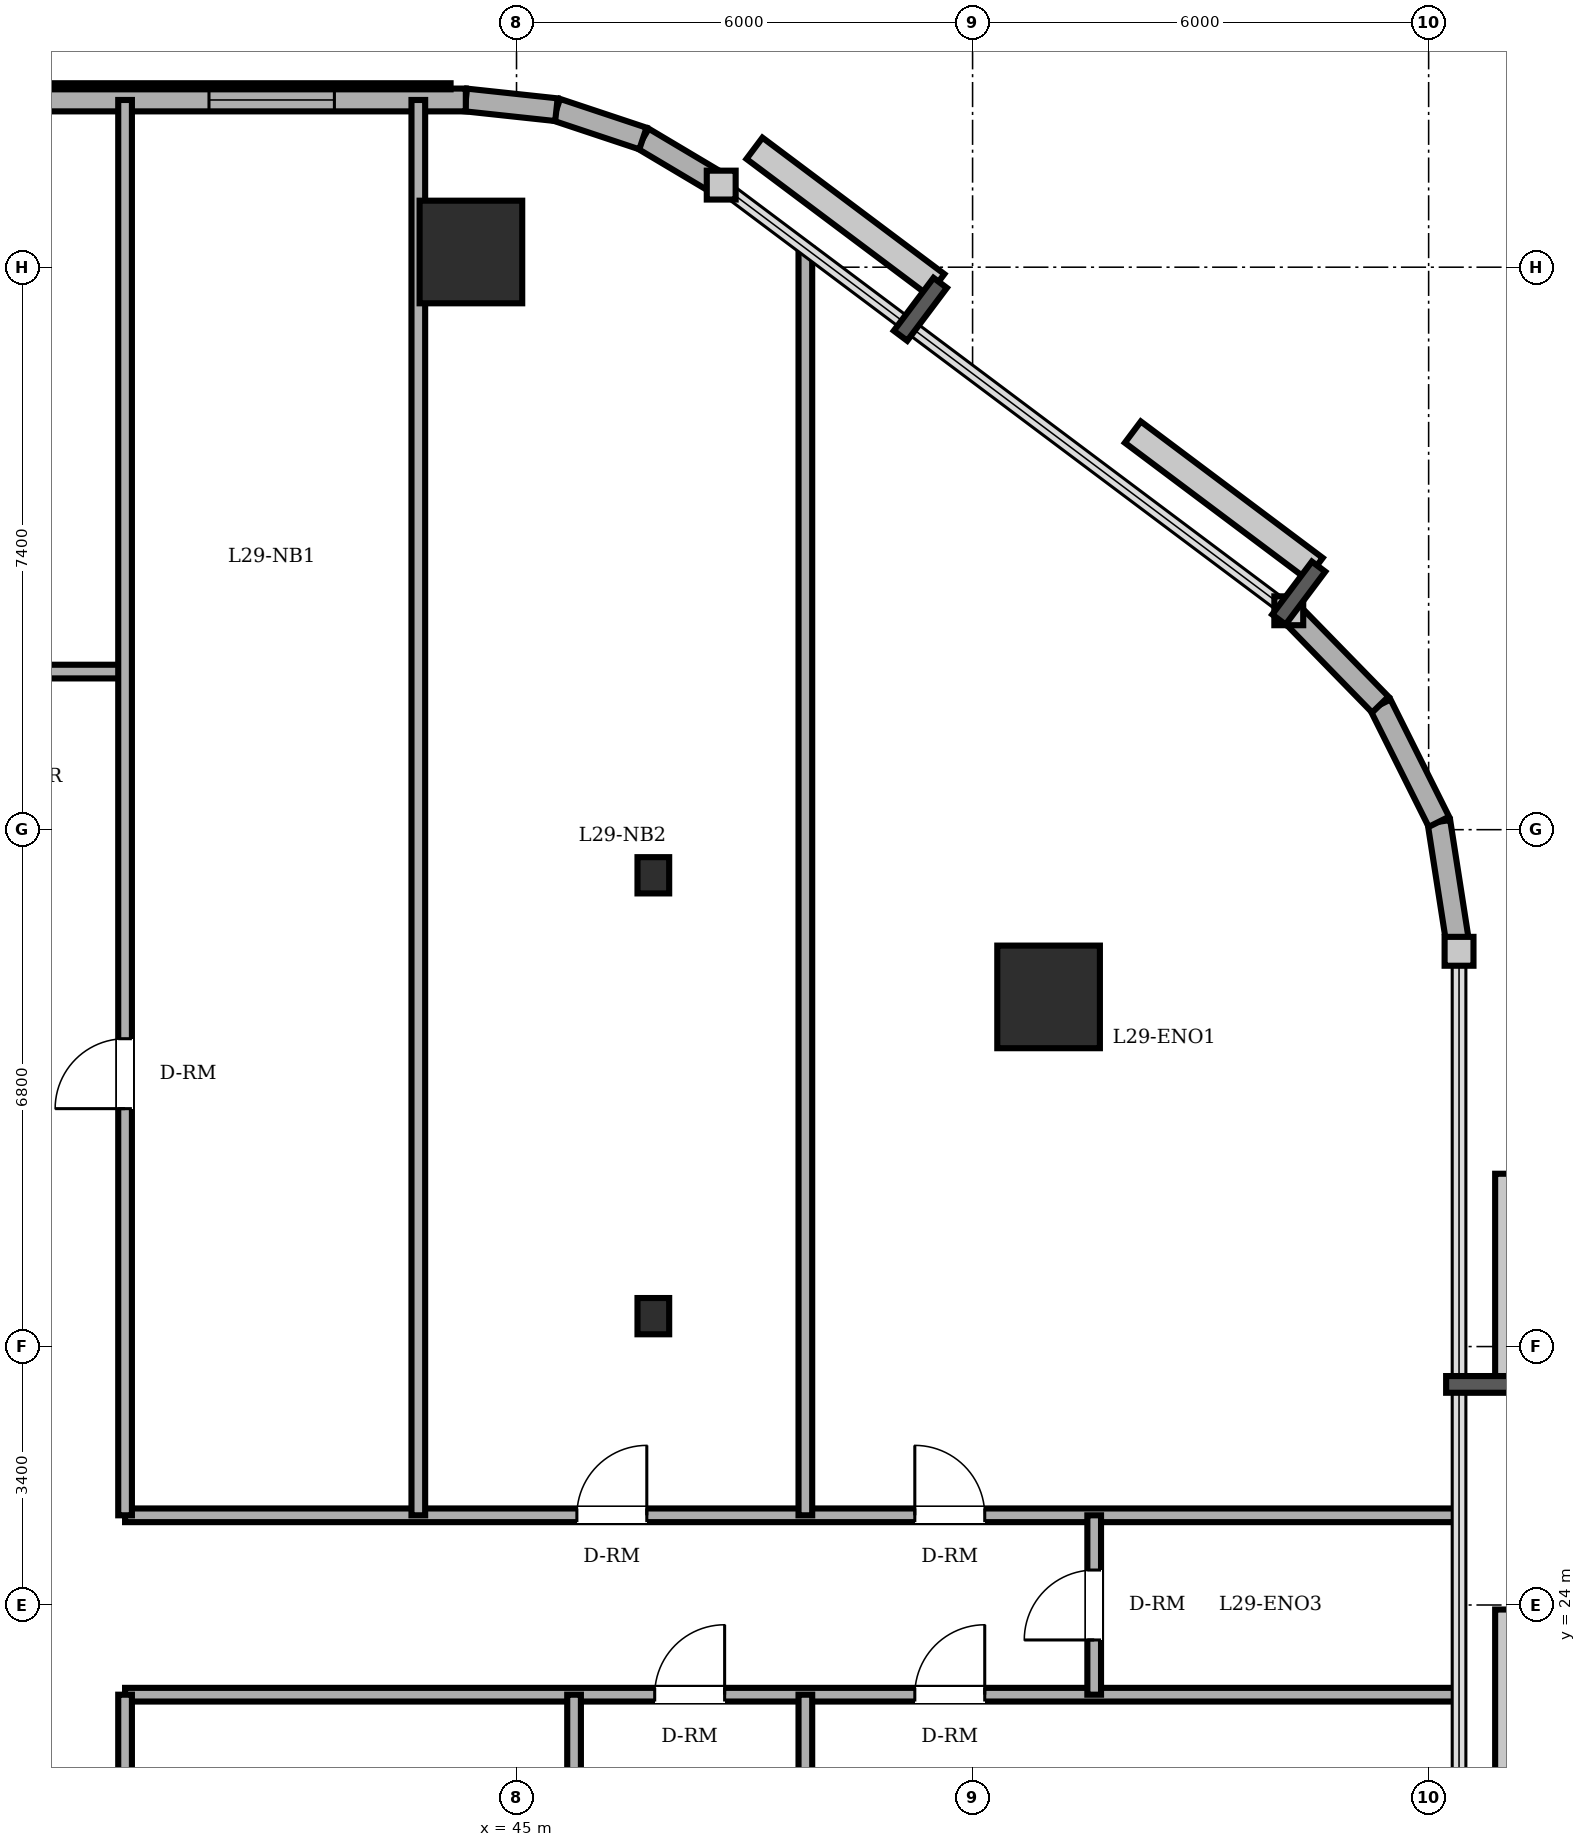
"""IFC4 building model, lengths in metres.
Left out: names, types, materials, properties, quantities, classifications, styles, units other than length and angle.
Written with IfcOpenShell. Run it as: python <this file> out.ifc"""

import sys

from ifc_helpers import new_model, si_unit, direction, frame, frame_2d, origin, origin_2d, place, context, subcontext, project, spatial, rectangle, circle, i_section, extrude, element, fill, save


model = new_model("IFC4")
c1 = context("Model", 3, precision=1e-05, world=origin(), true_north=direction((0.0, 1.0)))
c2 = subcontext(c1, "Body", "Model", "MODEL_VIEW")
j1 = project(units=[si_unit("LENGTHUNIT", "METRE"), si_unit("PLANEANGLEUNIT", "RADIAN")], contexts=[c1])
p1 = place(None, origin())
s1 = spatial("IfcSite", under=j1, at=p1, CompositionType="ELEMENT")
p2 = place(p1, origin())
s2 = spatial("IfcBuilding", under=s1, at=p2, CompositionType="ELEMENT")
p3 = place(p2, frame((0.0, 0.0, 111.5)))
s3 = spatial("IfcBuildingStorey", under=s2, at=p3, CompositionType="ELEMENT", Elevation=111.5)
for number, where, z_axis, x_axis in (
    (1, (52.0, 32.0, 0.0), (0.0, 0.0, 1.0), (1.0, 0.0, 0.0)),
    (2, (44.4, 41.8, 0.0), (0.0, 0.0, 1.0), (1.0, 0.0, 0.0)),
):
    element("IfcColumn", number, at=place(p3, frame(where, z_axis=z_axis, x_axis=x_axis)), inside=s3, PredefinedType="COLUMN", context=c2, shape_type="SweptSolid", body=[
        extrude(circle(Radius=0.675, at=origin_2d()), origin(), (0.0, 0.0, 1.0), 3.6),
    ])
for number, where, z_axis, x_axis in (
    (3, (46.8, 27.8, 0.0), (0.0, 0.0, 1.0), (1.0, 0.0, 0.0)),
    (4, (46.8, 33.6, 0.0), (0.0, 0.0, 1.0), (1.0, 0.0, 0.0)),
):
    element("IfcColumn", number, at=place(p3, frame(where, z_axis=z_axis, x_axis=x_axis)), inside=s3, PredefinedType="COLUMN", context=c2, shape_type="SweptSolid", body=[
        extrude(i_section(OverallWidth=0.417, OverallDepth=0.477, WebThickness=0.036, FlangeThickness=0.057, FilletRadius=0.015, at=origin_2d()), origin(), (0.0, 0.0, 1.0), 3.6),
    ])
p4 = place(p3, frame((57.4, 32.6, 0.0), z_axis=(0.0, 0.0, 1.0), x_axis=(-0.153620989032, 0.988129845581, 0.0)))
e5 = element("IfcWall", 5, at=p4, inside=s3, PredefinedType="SOLIDWALL", context=c2, shape_type="SweptSolid", body=[
    extrude(rectangle(XDim=1.724, YDim=0.3, at=frame_2d((0.862, 0.0))), origin(), (0.0, 0.0, 1.0), 3.4),
])
for number, where, z_axis, x_axis in (
    (6, (57.135, 34.304, 0.0), (0.0, 0.0, 1.0), (-0.447, 0.894, 0.0)),
    (7, (56.364, 35.846, 0.0), (0.0, 0.0, 1.0), (-0.698, 0.716, 0.0)),
):
    element("IfcWall", number, at=place(p3, frame(where, z_axis=z_axis, x_axis=x_axis)), inside=s3, PredefinedType="SOLIDWALL", context=c2, shape_type="SweptSolid", body=[
        extrude(rectangle(XDim=1.724, YDim=0.3, at=frame_2d((0.862, 0.0))), origin(), (0.0, 0.0, 1.0), 3.4),
    ])
p5 = place(p3, frame((47.693, 42.68, 0.0), z_axis=(0.0, 0.0, 1.0), x_axis=(-0.859320591642, 0.511437308749, 0.0)))
e8 = element("IfcWall", 8, at=p5, inside=s3, PredefinedType="SOLIDWALL", context=c2, shape_type="SweptSolid", body=[
    extrude(rectangle(XDim=1.199, YDim=0.3, at=frame_2d((0.599, 0.0))), origin(), (0.0, 0.0, 1.0), 3.4),
])
p6 = place(p3, frame((46.663, 43.293, 0.0), z_axis=(0.0, 0.0, 1.0), x_axis=(-0.948744332129, 0.316044604847, 0.0)))
e9 = element("IfcWall", 9, at=p6, inside=s3, PredefinedType="SOLIDWALL", context=c2, shape_type="SweptSolid", body=[
    extrude(rectangle(XDim=1.2, YDim=0.3, at=frame_2d((0.6, 0.0))), origin(), (0.0, 0.0, 1.0), 3.4),
])
p7 = place(p3, frame((45.525, 43.672, 0.0), z_axis=(0.0, 0.0, 1.0), x_axis=(-0.994289103787, 0.106720092254, 0.0)))
e10 = element("IfcWall", 10, at=p7, inside=s3, PredefinedType="SOLIDWALL", context=c2, shape_type="SweptSolid", body=[
    extrude(rectangle(XDim=1.199, YDim=0.3, at=frame_2d((0.599, 0.0))), origin(), (0.0, 0.0, 1.0), 3.4),
])
p8 = place(p3, frame((44.333, 43.8, 0.0), z_axis=(0.0, 0.0, 1.0), x_axis=(-1.0, 0.0, 0.0)))
e11 = element("IfcWall", 11, at=p8, inside=s3, PredefinedType="SOLIDWALL", context=c2, shape_type="SweptSolid", body=[
    extrude(rectangle(XDim=29.933, YDim=0.3, at=frame_2d((14.967, 0.0))), origin(), (0.0, 0.0, 1.0), 3.4),
])
p9 = place(p8, frame((22.708, 0.0, 0.0)))
e12 = element("IfcOpeningElement", 12, at=p9, cuts=e11, PredefinedType="OPENING", context=c2, shape_type="SweptSolid", body=[
    extrude(rectangle(XDim=0.95, YDim=2.2, at=frame_2d((0.475, 1.1))), frame((0.0, 0.16, 0.0), z_axis=(0.0, -1.0, 0.0), x_axis=(1.0, 0.0, 0.0)), (0.0, 0.0, 1.0), 0.32),
])
p10 = place(p8, frame((1.729, 0.0, 0.85)))
e13 = element("IfcOpeningElement", 13, at=p10, cuts=e11, PredefinedType="OPENING", context=c2, shape_type="SweptSolid", body=[
    extrude(rectangle(XDim=1.65, YDim=1.55, at=frame_2d((0.825, 0.775))), frame((0.0, 0.16, 0.0), z_axis=(0.0, -1.0, 0.0), x_axis=(1.0, 0.0, 0.0)), (0.0, 0.0, 1.0), 0.32),
])
p11 = place(p8, frame((6.341, 0.0, 0.85)))
e14 = element("IfcOpeningElement", 14, at=p11, cuts=e11, PredefinedType="OPENING", context=c2, shape_type="SweptSolid", body=[
    extrude(rectangle(XDim=1.65, YDim=1.55, at=frame_2d((0.825, 0.775))), frame((0.0, 0.16, 0.0), z_axis=(0.0, -1.0, 0.0), x_axis=(1.0, 0.0, 0.0)), (0.0, 0.0, 1.0), 0.32),
])
p12 = place(p8, frame((9.025, 0.0, 0.85)))
e15 = element("IfcOpeningElement", 15, at=p12, cuts=e11, PredefinedType="OPENING", context=c2, shape_type="SweptSolid", body=[
    extrude(rectangle(XDim=1.65, YDim=1.55, at=frame_2d((0.825, 0.775))), frame((0.0, 0.16, 0.0), z_axis=(0.0, -1.0, 0.0), x_axis=(1.0, 0.0, 0.0)), (0.0, 0.0, 1.0), 0.32),
])
p13 = place(p8, frame((14.108, 0.0, 0.85)))
e16 = element("IfcOpeningElement", 16, at=p13, cuts=e11, PredefinedType="OPENING", context=c2, shape_type="SweptSolid", body=[
    extrude(rectangle(XDim=1.65, YDim=1.55, at=frame_2d((0.825, 0.775))), frame((0.0, 0.16, 0.0), z_axis=(0.0, -1.0, 0.0), x_axis=(1.0, 0.0, 0.0)), (0.0, 0.0, 1.0), 0.32),
])
p14 = place(p8, frame((16.508, 0.0, 0.85)))
e17 = element("IfcOpeningElement", 17, at=p14, cuts=e11, PredefinedType="OPENING", context=c2, shape_type="SweptSolid", body=[
    extrude(rectangle(XDim=1.65, YDim=1.55, at=frame_2d((0.825, 0.775))), frame((0.0, 0.16, 0.0), z_axis=(0.0, -1.0, 0.0), x_axis=(1.0, 0.0, 0.0)), (0.0, 0.0, 1.0), 0.32),
])
p15 = place(p8, frame((25.475, 0.0, 0.85)))
e18 = element("IfcOpeningElement", 18, at=p15, cuts=e11, PredefinedType="OPENING", context=c2, shape_type="SweptSolid", body=[
    extrude(rectangle(XDim=1.65, YDim=1.55, at=frame_2d((0.825, 0.775))), frame((0.0, 0.16, 0.0), z_axis=(0.0, -1.0, 0.0), x_axis=(1.0, 0.0, 0.0)), (0.0, 0.0, 1.0), 0.32),
])
p16 = place(p3, frame((39.85, 22.82, 0.0), z_axis=(0.0, 0.0, 1.0), x_axis=(1.0, 0.0, 0.0)))
e19 = element("IfcWall", 19, at=p16, inside=s3, PredefinedType="PARTITIONING", context=c2, shape_type="SweptSolid", body=[
    extrude(rectangle(XDim=17.55, YDim=0.18, at=frame_2d((8.775, 0.0))), origin(), (0.0, 0.0, 1.0), 3.4),
])
p17 = place(p16, frame((6.968, 0.0, 0.0)))
e20 = element("IfcOpeningElement", 20, at=p17, cuts=e19, PredefinedType="OPENING", context=c2, shape_type="SweptSolid", body=[
    extrude(rectangle(XDim=0.92, YDim=2.1, at=frame_2d((0.46, 1.05))), frame((0.0, 0.1, 0.0), z_axis=(0.0, -1.0, 0.0), x_axis=(1.0, 0.0, 0.0)), (0.0, 0.0, 1.0), 0.2),
])
p18 = place(p16, frame((10.39, 0.0, 0.0)))
e21 = element("IfcOpeningElement", 21, at=p18, cuts=e19, PredefinedType="OPENING", context=c2, shape_type="SweptSolid", body=[
    extrude(rectangle(XDim=0.92, YDim=2.1, at=frame_2d((0.46, 1.05))), frame((0.0, 0.1, 0.0), z_axis=(0.0, -1.0, 0.0), x_axis=(1.0, 0.0, 0.0)), (0.0, 0.0, 1.0), 0.2),
])
p19 = place(p3, frame((39.85, 25.18, 0.0), z_axis=(0.0, 0.0, 1.0), x_axis=(1.0, 0.0, 0.0)))
e22 = element("IfcWall", 22, at=p19, inside=s3, PredefinedType="PARTITIONING", context=c2, shape_type="SweptSolid", body=[
    extrude(rectangle(XDim=17.55, YDim=0.18, at=frame_2d((8.775, 0.0))), origin(), (0.0, 0.0, 1.0), 3.4),
])
p20 = place(p19, frame((5.944, 0.0, 0.0)))
e23 = element("IfcOpeningElement", 23, at=p20, cuts=e22, PredefinedType="OPENING", context=c2, shape_type="SweptSolid", body=[
    extrude(rectangle(XDim=0.92, YDim=2.1, at=frame_2d((0.46, 1.05))), frame((0.0, 0.1, 0.0), z_axis=(0.0, -1.0, 0.0), x_axis=(1.0, 0.0, 0.0)), (0.0, 0.0, 1.0), 0.2),
])
p21 = place(p19, frame((10.39, 0.0, 0.0)))
e24 = element("IfcOpeningElement", 24, at=p21, cuts=e22, PredefinedType="OPENING", context=c2, shape_type="SweptSolid", body=[
    extrude(rectangle(XDim=0.92, YDim=2.1, at=frame_2d((0.46, 1.05))), frame((0.0, 0.1, 0.0), z_axis=(0.0, -1.0, 0.0), x_axis=(1.0, 0.0, 0.0)), (0.0, 0.0, 1.0), 0.2),
])
p22 = place(p3, frame((8.8, 36.28, 0.0), z_axis=(0.0, 0.0, 1.0), x_axis=(1.0, 0.0, 0.0)))
e25 = element("IfcWall", 25, at=p22, inside=s3, PredefinedType="PARTITIONING", context=c2, shape_type="SweptSolid", body=[
    extrude(rectangle(XDim=31.05, YDim=0.18, at=frame_2d((15.525, 0.0))), origin(), (0.0, 0.0, 1.0), 3.4),
])
p23 = place(p22, frame((17.05, 0.0, 0.0)))
e26 = element("IfcOpeningElement", 26, at=p23, cuts=e25, PredefinedType="OPENING", context=c2, shape_type="SweptSolid", body=[
    extrude(rectangle(XDim=0.9, YDim=2.1, at=frame_2d((0.45, 1.05))), frame((0.0, 0.1, 0.0), z_axis=(0.0, -1.0, 0.0), x_axis=(1.0, 0.0, 0.0)), (0.0, 0.0, 1.0), 0.2),
])
p24 = place(p22, frame((20.67, 0.0, 0.0)))
e27 = element("IfcOpeningElement", 27, at=p24, cuts=e25, PredefinedType="OPENING", context=c2, shape_type="SweptSolid", body=[
    extrude(rectangle(XDim=0.86, YDim=2.1, at=frame_2d((0.43, 1.05))), frame((0.0, 0.1, 0.0), z_axis=(0.0, -1.0, 0.0), x_axis=(1.0, 0.0, 0.0)), (0.0, 0.0, 1.0), 0.2),
])
p25 = place(p22, frame((8.04, 0.0, 0.0)))
e28 = element("IfcOpeningElement", 28, at=p25, cuts=e25, PredefinedType="OPENING", context=c2, shape_type="SweptSolid", body=[
    extrude(rectangle(XDim=0.92, YDim=2.1, at=frame_2d((0.46, 1.05))), frame((0.0, 0.1, 0.0), z_axis=(0.0, -1.0, 0.0), x_axis=(1.0, 0.0, 0.0)), (0.0, 0.0, 1.0), 0.2),
])
p26 = place(p22, frame((26.305, 0.0, 0.0)))
e29 = element("IfcOpeningElement", 29, at=p26, cuts=e25, PredefinedType="OPENING", context=c2, shape_type="SweptSolid", body=[
    extrude(rectangle(XDim=0.92, YDim=2.1, at=frame_2d((0.46, 1.05))), frame((0.0, 0.1, 0.0), z_axis=(0.0, -1.0, 0.0), x_axis=(1.0, 0.0, 0.0)), (0.0, 0.0, 1.0), 0.2),
])
p27 = place(p3, frame((39.85, 4.2, 0.0), z_axis=(0.0, 0.0, 1.0), x_axis=(0.0, 1.0, 0.0)))
e30 = element("IfcWall", 30, at=p27, inside=s3, PredefinedType="PARTITIONING", context=c2, shape_type="SweptSolid", body=[
    extrude(rectangle(XDim=18.62, YDim=0.18, at=frame_2d((9.31, 0.0))), origin(), (0.0, 0.0, 1.0), 3.4),
])
p28 = place(p27, frame((12.35, 0.0, 0.0)))
e31 = element("IfcOpeningElement", 31, at=p28, cuts=e30, PredefinedType="OPENING", context=c2, shape_type="SweptSolid", body=[
    extrude(rectangle(XDim=0.92, YDim=2.1, at=frame_2d((0.46, 1.05))), frame((0.0, 0.1, 0.0), z_axis=(0.0, -1.0, 0.0), x_axis=(1.0, 0.0, 0.0)), (0.0, 0.0, 1.0), 0.2),
])
p29 = place(p3, frame((39.85, 25.18, 0.0), z_axis=(0.0, 0.0, 1.0), x_axis=(0.0, 1.0, 0.0)))
e32 = element("IfcWall", 32, at=p29, inside=s3, PredefinedType="PARTITIONING", context=c2, shape_type="SweptSolid", body=[
    extrude(rectangle(XDim=18.62, YDim=0.18, at=frame_2d((9.31, 0.0))), origin(), (0.0, 0.0, 1.0), 3.4),
])
p30 = place(p29, frame((5.35, 0.0, 0.0)))
e33 = element("IfcOpeningElement", 33, at=p30, cuts=e32, PredefinedType="OPENING", context=c2, shape_type="SweptSolid", body=[
    extrude(rectangle(XDim=0.92, YDim=2.1, at=frame_2d((0.46, 1.05))), frame((0.0, 0.1, 0.0), z_axis=(0.0, -1.0, 0.0), x_axis=(1.0, 0.0, 0.0)), (0.0, 0.0, 1.0), 0.2),
])
p31 = place(p3, frame((43.708, 25.18, 0.0), z_axis=(0.0, 0.0, 1.0), x_axis=(0.0, 1.0, 0.0)))
e34 = element("IfcWall", 34, at=p31, inside=s3, PredefinedType="PARTITIONING", context=c2, shape_type="SweptSolid", body=[
    extrude(rectangle(XDim=18.62, YDim=0.18, at=frame_2d((9.31, 0.0))), origin(), (0.0, 0.0, 1.0), 3.4),
])
p32 = place(p3, frame((45.757, 4.405, 0.0), z_axis=(0.0, 0.0, 1.0), x_axis=(0.0, 1.0, 0.0)))
e35 = element("IfcWall", 35, at=p32, inside=s3, PredefinedType="PARTITIONING", context=c2, shape_type="SweptSolid", body=[
    extrude(rectangle(XDim=18.415, YDim=0.18, at=frame_2d((9.208, 0.0))), origin(), (0.0, 0.0, 1.0), 2.882),
])
for number, where, z_axis, x_axis in (
    (36, (48.8, 6.15, 0.0), (0.0, 0.0, 1.0), (0.0, 1.0, 0.0)),
    (37, (48.8, 25.18, 0.0), (0.0, 0.0, 1.0), (0.0, 1.0, 0.0)),
):
    element("IfcWall", number, at=place(p3, frame(where, z_axis=z_axis, x_axis=x_axis)), inside=s3, PredefinedType="PARTITIONING", context=c2, shape_type="SweptSolid", body=[
        extrude(rectangle(XDim=16.67, YDim=0.18, at=frame_2d((8.335, 0.0))), origin(), (0.0, 0.0, 1.0), 3.4),
    ])
p33 = place(p3, frame((52.6, 22.82, 0.0), z_axis=(0.0, 0.0, 1.0), x_axis=(0.0, 1.0, 0.0)))
e38 = element("IfcWall", 38, at=p33, inside=s3, PredefinedType="PARTITIONING", context=c2, shape_type="SweptSolid", body=[
    extrude(rectangle(XDim=2.36, YDim=0.18, at=frame_2d((1.18, 0.0))), origin(), (0.0, 0.0, 1.0), 3.4),
])
p34 = place(p33, frame((0.72, 0.0, 0.0)))
e39 = element("IfcOpeningElement", 39, at=p34, cuts=e38, PredefinedType="OPENING", context=c2, shape_type="SweptSolid", body=[
    extrude(rectangle(XDim=0.92, YDim=2.1, at=frame_2d((0.46, 1.05))), frame((0.0, 0.1, 0.0), z_axis=(0.0, -1.0, 0.0), x_axis=(1.0, 0.0, 0.0)), (0.0, 0.0, 1.0), 0.2),
])
p35 = place(p10, origin())
e40 = element("IfcWindow", 40, at=p35, inside=s3, PartitioningType="DOUBLE_PANEL_VERTICAL", PredefinedType="WINDOW", context=c2, shape_type="SweptSolid", body=[
    extrude(rectangle(XDim=1.65, YDim=1.55, at=frame_2d((0.825, 0.775))), frame((0.0, 0.03, 0.0), z_axis=(0.0, -1.0, 0.0), x_axis=(1.0, 0.0, 0.0)), (0.0, 0.0, 1.0), 0.06),
])
fill(e13, e40)
p36 = place(p30, origin())
e41 = element("IfcDoor", 41, at=p36, inside=s3, OperationType="SINGLE_SWING_LEFT", PredefinedType="DOOR", context=c2, shape_type="SweptSolid", body=[
    extrude(rectangle(XDim=0.92, YDim=2.1, at=frame_2d((0.46, 1.05))), frame((0.0, 0.025, 0.0), z_axis=(0.0, -1.0, 0.0), x_axis=(1.0, 0.0, 0.0)), (0.0, 0.0, 1.0), 0.05),
])
fill(e33, e41)
p37 = place(p20, origin())
e42 = element("IfcDoor", 42, at=p37, inside=s3, OperationType="SINGLE_SWING_RIGHT", PredefinedType="DOOR", context=c2, shape_type="SweptSolid", body=[
    extrude(rectangle(XDim=0.92, YDim=2.1, at=frame_2d((0.46, 1.05))), frame((0.0, 0.025, 0.0), z_axis=(0.0, -1.0, 0.0), x_axis=(1.0, 0.0, 0.0)), (0.0, 0.0, 1.0), 0.05),
])
fill(e23, e42)
p38 = place(p17, origin())
e43 = element("IfcDoor", 43, at=p38, inside=s3, OperationType="SINGLE_SWING_RIGHT", PredefinedType="DOOR", context=c2, shape_type="SweptSolid", body=[
    extrude(rectangle(XDim=0.92, YDim=2.1, at=frame_2d((0.46, 1.05))), frame((0.0, 0.025, 0.0), z_axis=(0.0, -1.0, 0.0), x_axis=(1.0, 0.0, 0.0)), (0.0, 0.0, 1.0), 0.05),
])
fill(e20, e43)
p39 = place(p21, origin())
e44 = element("IfcDoor", 44, at=p39, inside=s3, OperationType="SINGLE_SWING_LEFT", PredefinedType="DOOR", context=c2, shape_type="SweptSolid", body=[
    extrude(rectangle(XDim=0.92, YDim=2.1, at=frame_2d((0.46, 1.05))), frame((0.0, 0.025, 0.0), z_axis=(0.0, -1.0, 0.0), x_axis=(1.0, 0.0, 0.0)), (0.0, 0.0, 1.0), 0.05),
])
fill(e24, e44)
p40 = place(p18, origin())
e45 = element("IfcDoor", 45, at=p40, inside=s3, OperationType="SINGLE_SWING_RIGHT", PredefinedType="DOOR", context=c2, shape_type="SweptSolid", body=[
    extrude(rectangle(XDim=0.92, YDim=2.1, at=frame_2d((0.46, 1.05))), frame((0.0, 0.025, 0.0), z_axis=(0.0, -1.0, 0.0), x_axis=(1.0, 0.0, 0.0)), (0.0, 0.0, 1.0), 0.05),
])
fill(e21, e45)
p41 = place(p34, origin())
e46 = element("IfcDoor", 46, at=p41, inside=s3, OperationType="SINGLE_SWING_LEFT", PredefinedType="DOOR", context=c2, shape_type="SweptSolid", body=[
    extrude(rectangle(XDim=0.92, YDim=2.1, at=frame_2d((0.46, 1.05))), frame((0.0, 0.025, 0.0), z_axis=(0.0, -1.0, 0.0), x_axis=(1.0, 0.0, 0.0)), (0.0, 0.0, 1.0), 0.05),
])
fill(e39, e46)
save(model, sys.argv[1])
